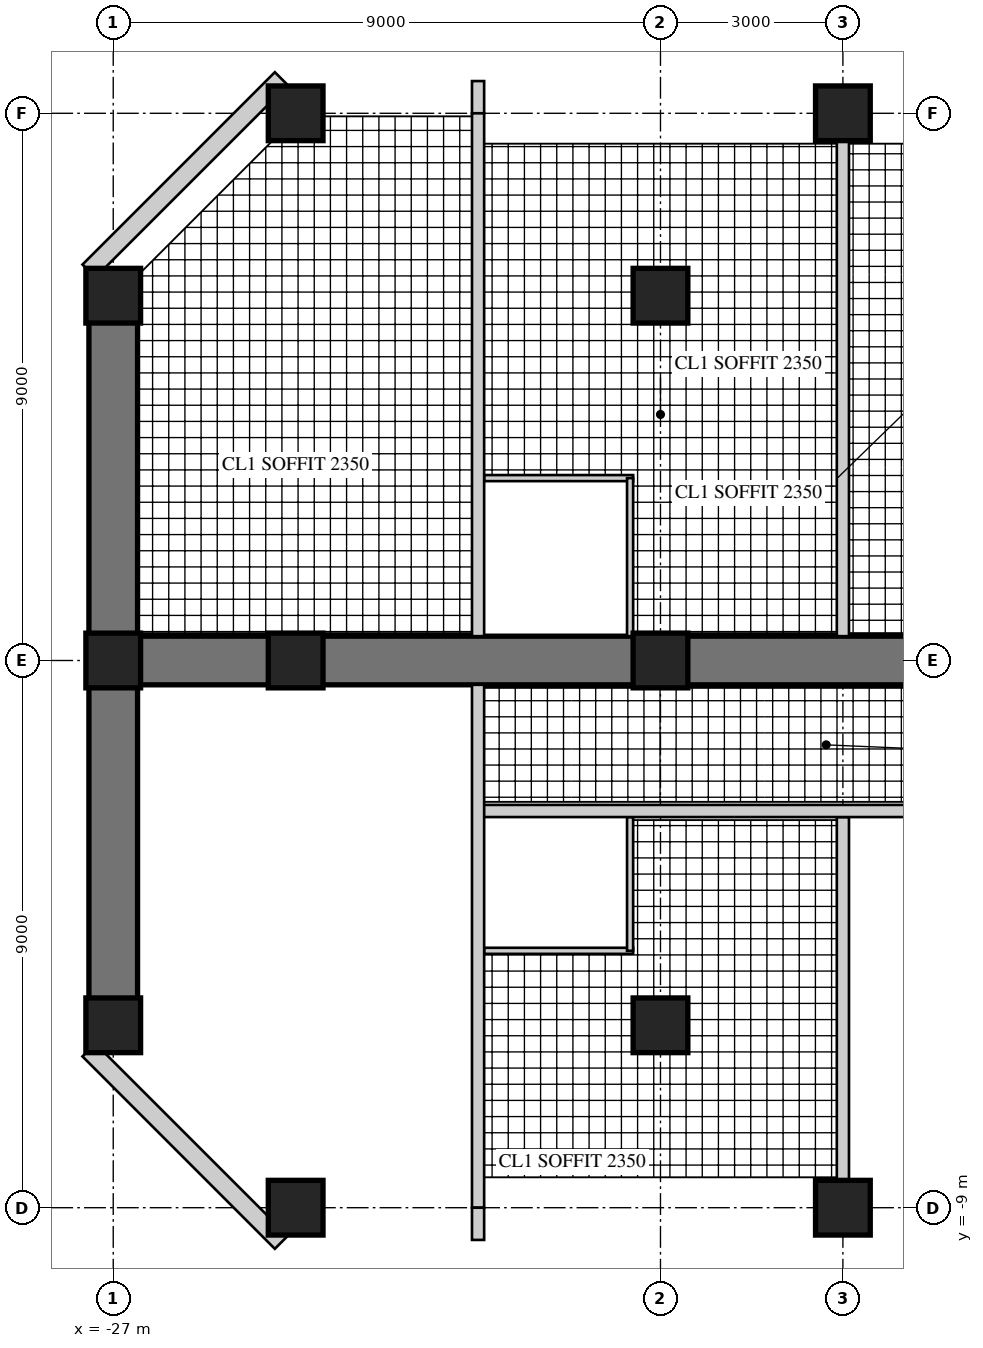
"""IFC4 building model, lengths in metres.
Left out: names, types, materials, properties, quantities, classifications, styles, units other than length and angle.
Written with IfcOpenShell. Run it as: python <this file> out.ifc"""

import sys

from ifc_helpers import new_model, si_unit, direction, frame, frame_2d, origin, origin_2d, place, context, subcontext, project, spatial, rectangle, hollow_rectangle, extrude, element, fill, save


model = new_model("IFC4")
c1 = context("Model", 3, precision=1e-05, world=origin(), true_north=direction((0.0, 1.0)))
c2 = subcontext(c1, "Body", "Model", "MODEL_VIEW")
j1 = project(units=[si_unit("LENGTHUNIT", "METRE"), si_unit("PLANEANGLEUNIT", "RADIAN")], contexts=[c1])
p1 = place(None, origin())
s1 = spatial("IfcSite", under=j1, at=p1, CompositionType="ELEMENT")
p2 = place(p1, origin())
s2 = spatial("IfcBuilding", under=s1, at=p2, CompositionType="ELEMENT")
p3 = place(p2, frame((0.0, 0.0, 179.7)))
s3 = spatial("IfcBuildingStorey", under=s2, at=p3, CompositionType="ELEMENT", Elevation=179.7)
p4 = place(p3, frame((-9.0, 0.0, 0.0), z_axis=(0.0, 0.0, 1.0), x_axis=(-1.0, 0.0, 0.0)))
e1 = element("IfcWall", 1, at=p4, inside=s3, PredefinedType="SHEAR", context=c2, shape_type="SweptSolid", body=[
    extrude(rectangle(XDim=18.0, YDim=0.8, at=frame_2d((9.0, 0.0))), origin(), (0.0, 0.0, 1.0), 3.4),
])
p5 = place(p4, frame((3.95, 0.0, 0.0)))
e2 = element("IfcOpeningElement", 2, at=p5, cuts=e1, PredefinedType="OPENING", context=c2, shape_type="SweptSolid", body=[
    extrude(rectangle(XDim=1.0, YDim=2.15, at=frame_2d((0.5, 1.075))), frame((0.0, 0.41, 0.0), z_axis=(0.0, -1.0, 0.0), x_axis=(1.0, 0.0, 0.0)), (0.0, 0.0, 1.0), 0.82),
])
p6 = place(p4, frame((6.6, 0.0, 0.0)))
e3 = element("IfcOpeningElement", 3, at=p6, cuts=e1, PredefinedType="OPENING", context=c2, shape_type="SweptSolid", body=[
    extrude(rectangle(XDim=1.0, YDim=2.15, at=frame_2d((0.5, 1.075))), frame((0.0, 0.41, 0.0), z_axis=(0.0, -1.0, 0.0), x_axis=(1.0, 0.0, 0.0)), (0.0, 0.0, 1.0), 0.82),
])
p7 = place(p4, frame((13.25, 0.0, 0.0)))
e4 = element("IfcOpeningElement", 4, at=p7, cuts=e1, PredefinedType="OPENING", context=c2, shape_type="SweptSolid", body=[
    extrude(rectangle(XDim=1.0, YDim=2.2, at=frame_2d((0.5, 1.1))), frame((0.0, 0.41, 0.0), z_axis=(0.0, -1.0, 0.0), x_axis=(1.0, 0.0, 0.0)), (0.0, 0.0, 1.0), 0.82),
])
p8 = place(p3, frame((-27.0, 6.0, 0.0), z_axis=(0.0, 0.0, 1.0), x_axis=(0.0, -1.0, 0.0)))
e5 = element("IfcWall", 5, at=p8, inside=s3, PredefinedType="SHEAR", context=c2, shape_type="SweptSolid", body=[
    extrude(rectangle(XDim=12.0, YDim=0.8, at=frame_2d((6.0, 0.0))), origin(), (0.0, 0.0, 1.0), 3.4),
])
p9 = place(p8, frame((1.625, 0.0, 0.6)))
e6 = element("IfcOpeningElement", 6, at=p9, cuts=e5, PredefinedType="OPENING", context=c2, shape_type="SweptSolid", body=[
    extrude(rectangle(XDim=3.0, YDim=2.4, at=frame_2d((1.5, 1.2))), frame((0.0, 0.41, 0.0), z_axis=(0.0, -1.0, 0.0), x_axis=(1.0, 0.0, 0.0)), (0.0, 0.0, 1.0), 0.82),
])
p10 = place(p8, frame((7.375, 0.0, 0.6)))
e7 = element("IfcOpeningElement", 7, at=p10, cuts=e5, PredefinedType="OPENING", context=c2, shape_type="SweptSolid", body=[
    extrude(rectangle(XDim=3.0, YDim=2.4, at=frame_2d((1.5, 1.2))), frame((0.0, 0.41, 0.0), z_axis=(0.0, -1.0, 0.0), x_axis=(1.0, 0.0, 0.0)), (0.0, 0.0, 1.0), 0.82),
])
for number, where, z_axis, x_axis in (
    (8, (-15.0, 9.0, 0.0), (0.0, 0.0, 1.0), (1.0, 0.0, 0.0)),
    (9, (-24.0, 9.0, 0.0), (0.0, 0.0, 1.0), (1.0, 0.0, 0.0)),
    (10, (-15.0, -9.0, 0.0), (0.0, 0.0, 1.0), (1.0, 0.0, 0.0)),
    (11, (-24.0, -9.0, 0.0), (0.0, 0.0, 1.0), (1.0, 0.0, 0.0)),
    (12, (-27.0, 6.0, 0.0), (0.0, 0.0, 1.0), (1.0, 0.0, 0.0)),
    (13, (-27.0, 0.0, 0.0), (0.0, 0.0, 1.0), (1.0, 0.0, 0.0)),
    (14, (-27.0, -6.0, 0.0), (0.0, 0.0, 1.0), (1.0, 0.0, 0.0)),
    (15, (-18.0, 6.0, 0.0), (0.0, 0.0, 1.0), (1.0, 0.0, 0.0)),
    (16, (-18.0, 0.0, 0.0), (0.0, 0.0, 1.0), (1.0, 0.0, 0.0)),
    (17, (-18.0, -6.0, 0.0), (0.0, 0.0, 1.0), (1.0, 0.0, 0.0)),
    (18, (-24.0, 0.0, 0.0), (0.0, 0.0, 1.0), (1.0, 0.0, 0.0)),
):
    element("IfcColumn", number, at=place(p3, frame(where, z_axis=z_axis, x_axis=x_axis)), inside=s3, PredefinedType="COLUMN", context=c2, shape_type="SweptSolid", body=[
        extrude(rectangle(XDim=0.9, YDim=0.9, at=origin_2d()), origin(), (0.0, 0.0, 1.0), 3.4),
    ])
p11 = place(p3, frame((-24.236, 9.57, 0.0), z_axis=(0.0, 0.0, 1.0), x_axis=(-0.707079499254, -0.707134062067, 0.0)))
e19 = element("IfcWall", 19, at=p11, inside=s3, PredefinedType="SOLIDWALL", context=c2, shape_type="SweptSolid", body=[
    extrude(rectangle(XDim=4.475, YDim=0.3, at=frame_2d((2.237, 0.0))), origin(), (0.0, 0.0, 1.0), 3.22),
])
p12 = place(p11, frame((1.787, 0.0, 0.3)))
e20 = element("IfcOpeningElement", 20, at=p12, cuts=e19, PredefinedType="OPENING", context=c2, shape_type="SweptSolid", body=[
    extrude(rectangle(XDim=0.9, YDim=2.4, at=frame_2d((0.45, 1.2))), frame((0.0, 0.16, 0.0), z_axis=(0.0, -1.0, 0.0), x_axis=(1.0, 0.0, 0.0)), (0.0, 0.0, 1.0), 0.32),
])
p13 = place(p3, frame((-27.4, -6.406, 0.0), z_axis=(0.0, 0.0, 1.0), x_axis=(0.707079499254, -0.707134062067, 0.0)))
e21 = element("IfcWall", 21, at=p13, inside=s3, PredefinedType="SOLIDWALL", context=c2, shape_type="SweptSolid", body=[
    extrude(rectangle(XDim=4.475, YDim=0.3, at=frame_2d((2.237, 0.0))), origin(), (0.0, 0.0, 1.0), 3.22),
])
p14 = place(p13, frame((1.787, 0.0, 0.3)))
e22 = element("IfcOpeningElement", 22, at=p14, cuts=e21, PredefinedType="OPENING", context=c2, shape_type="SweptSolid", body=[
    extrude(rectangle(XDim=0.9, YDim=2.4, at=frame_2d((0.45, 1.2))), frame((0.0, 0.16, 0.0), z_axis=(0.0, -1.0, 0.0), x_axis=(1.0, 0.0, 0.0)), (0.0, 0.0, 1.0), 0.32),
])
p15 = place(p3, frame((-15.0, -2.575, 0.0), z_axis=(0.0, 0.0, 1.0), x_axis=(0.0, -1.0, 0.0)))
e23 = element("IfcWall", 23, at=p15, inside=s3, PredefinedType="SOLIDWALL", context=c2, shape_type="SweptSolid", body=[
    extrude(rectangle(XDim=5.975, YDim=0.2, at=frame_2d((2.988, 0.0))), origin(), (0.0, 0.0, 1.0), 2.47),
])
p16 = place(p3, frame((-15.0, 8.55, 0.0), z_axis=(0.0, 0.0, 1.0), x_axis=(0.0, -1.0, 0.0)))
e24 = element("IfcWall", 24, at=p16, inside=s3, PredefinedType="SOLIDWALL", context=c2, shape_type="SweptSolid", body=[
    extrude(rectangle(XDim=8.15, YDim=0.2, at=frame_2d((4.075, 0.0))), origin(), (0.0, 0.0, 1.0), 2.47),
])
p17 = place(p3, frame((-18.45, -4.775, 0.0), z_axis=(0.0, 0.0, 1.0), x_axis=(-1.0, 0.0, 0.0)))
e25 = element("IfcWall", 25, at=p17, inside=s3, PredefinedType="PARTITIONING", context=c2, shape_type="SweptSolid", body=[
    extrude(rectangle(XDim=2.45, YDim=0.1, at=frame_2d((1.225, 0.0))), origin(), (0.0, 0.0, 1.0), 3.22),
])
p18 = place(p3, frame((-18.5, -2.575, 0.0), z_axis=(0.0, 0.0, 1.0), x_axis=(0.0, -1.0, 0.0)))
e26 = element("IfcWall", 26, at=p18, inside=s3, PredefinedType="PARTITIONING", context=c2, shape_type="SweptSolid", body=[
    extrude(rectangle(XDim=2.2, YDim=0.1, at=frame_2d((1.1, 0.0))), origin(), (0.0, 0.0, 1.0), 3.22),
])
p19 = place(p18, frame((0.55, 0.0, 0.0)))
e27 = element("IfcOpeningElement", 27, at=p19, cuts=e26, PredefinedType="OPENING", context=c2, shape_type="SweptSolid", body=[
    extrude(rectangle(XDim=0.9, YDim=2.1, at=frame_2d((0.45, 1.05))), frame((0.0, 0.06, 0.0), z_axis=(0.0, -1.0, 0.0), x_axis=(1.0, 0.0, 0.0)), (0.0, 0.0, 1.0), 0.12),
])
p20 = place(p3, frame((-18.45, 3.0, 0.0), z_axis=(0.0, 0.0, 1.0), x_axis=(-1.0, 0.0, 0.0)))
e28 = element("IfcWall", 28, at=p20, inside=s3, PredefinedType="PARTITIONING", context=c2, shape_type="SweptSolid", body=[
    extrude(rectangle(XDim=2.45, YDim=0.1, at=frame_2d((1.225, 0.0))), origin(), (0.0, 0.0, 1.0), 3.22),
])
p21 = place(p3, frame((-18.5, 3.0, 0.0), z_axis=(0.0, 0.0, 1.0), x_axis=(0.0, -1.0, 0.0)))
e29 = element("IfcWall", 29, at=p21, inside=s3, PredefinedType="PARTITIONING", context=c2, shape_type="SweptSolid", body=[
    extrude(rectangle(XDim=2.6, YDim=0.1, at=frame_2d((1.3, 0.0))), origin(), (0.0, 0.0, 1.0), 3.22),
])
p22 = place(p21, frame((0.55, 0.0, 0.0)))
e30 = element("IfcOpeningElement", 30, at=p22, cuts=e29, PredefinedType="OPENING", context=c2, shape_type="SweptSolid", body=[
    extrude(rectangle(XDim=0.9, YDim=2.1, at=frame_2d((0.45, 1.05))), frame((0.0, 0.06, 0.0), z_axis=(0.0, -1.0, 0.0), x_axis=(1.0, 0.0, 0.0)), (0.0, 0.0, 1.0), 0.12),
])
p23 = place(p3, frame((-9.55, -2.475, 0.0), z_axis=(0.0, 0.0, 1.0), x_axis=(-1.0, 0.0, 0.0)))
e31 = element("IfcWall", 31, at=p23, inside=s3, PredefinedType="SOLIDWALL", context=c2, shape_type="SweptSolid", body=[
    extrude(rectangle(XDim=11.45, YDim=0.2, at=frame_2d((5.725, 0.0))), origin(), (0.0, 0.0, 1.0), 3.22),
])
p24 = place(p23, frame((3.6, 0.0, 0.0)))
e32 = element("IfcOpeningElement", 32, at=p24, cuts=e31, PredefinedType="OPENING", context=c2, shape_type="SweptSolid", body=[
    extrude(rectangle(XDim=1.0, YDim=2.15, at=frame_2d((0.5, 1.075))), frame((0.0, 0.11, 0.0), z_axis=(0.0, -1.0, 0.0), x_axis=(1.0, 0.0, 0.0)), (0.0, 0.0, 1.0), 0.22),
])
p25 = place(p23, frame((6.05, 0.0, 0.0)))
e33 = element("IfcOpeningElement", 33, at=p25, cuts=e31, PredefinedType="OPENING", context=c2, shape_type="SweptSolid", body=[
    extrude(rectangle(XDim=1.0, YDim=2.15, at=frame_2d((0.5, 1.075))), frame((0.0, 0.11, 0.0), z_axis=(0.0, -1.0, 0.0), x_axis=(1.0, 0.0, 0.0)), (0.0, 0.0, 1.0), 0.22),
])
p26 = place(p3, frame((-21.0, 9.53, 0.0), z_axis=(0.0, 0.0, 1.0), x_axis=(0.0, -1.0, 0.0)))
e34 = element("IfcWall", 34, at=p26, inside=s3, PredefinedType="SOLIDWALL", context=c2, shape_type="SweptSolid", body=[
    extrude(rectangle(XDim=0.53, YDim=0.2, at=frame_2d((0.265, 0.0))), origin(), (0.0, 0.0, 1.0), 3.22),
])
p27 = place(p3, frame((-21.0, 9.0, 0.0), z_axis=(0.0, 0.0, 1.0), x_axis=(0.0, -1.0, 0.0)))
e35 = element("IfcWall", 35, at=p27, inside=s3, PredefinedType="SOLIDWALL", context=c2, shape_type="SweptSolid", body=[
    extrude(rectangle(XDim=8.6, YDim=0.2, at=frame_2d((4.3, 0.0))), origin(), (0.0, 0.0, 1.0), 2.62),
])
p28 = place(p3, frame((-21.0, -0.4, 0.0), z_axis=(0.0, 0.0, 1.0), x_axis=(0.0, -1.0, 0.0)))
e36 = element("IfcWall", 36, at=p28, inside=s3, PredefinedType="SOLIDWALL", context=c2, shape_type="SweptSolid", body=[
    extrude(rectangle(XDim=8.6, YDim=0.2, at=frame_2d((4.3, 0.0))), origin(), (0.0, 0.0, 1.0), 2.62),
])
p29 = place(p28, frame((0.4, 0.0, 0.0)))
e37 = element("IfcOpeningElement", 37, at=p29, cuts=e36, PredefinedType="OPENING", context=c2, shape_type="SweptSolid", body=[
    extrude(rectangle(XDim=1.0, YDim=2.2, at=frame_2d((0.5, 1.1))), frame((0.0, 0.11, 0.0), z_axis=(0.0, -1.0, 0.0), x_axis=(1.0, 0.0, 0.0)), (0.0, 0.0, 1.0), 0.22),
])
p30 = place(p3, frame((-21.0, -9.0, 0.0), z_axis=(0.0, 0.0, 1.0), x_axis=(0.0, -1.0, 0.0)))
e38 = element("IfcWall", 38, at=p30, inside=s3, PredefinedType="SOLIDWALL", context=c2, shape_type="SweptSolid", body=[
    extrude(rectangle(XDim=0.53, YDim=0.2, at=frame_2d((0.265, 0.0))), origin(), (0.0, 0.0, 1.0), 3.22),
])
p31 = place(p12, origin())
e39 = element("IfcWindow", 39, at=p31, inside=s3, PartitioningType="SINGLE_PANEL", PredefinedType="WINDOW", context=c2, shape_type="SweptSolid", body=[
    extrude(hollow_rectangle(XDim=0.9, YDim=2.4, WallThickness=0.06, at=frame_2d((0.45, 1.2))), frame((0.0, 0.03, 0.0), z_axis=(0.0, -1.0, 0.0), x_axis=(1.0, 0.0, 0.0)), (0.0, 0.0, 1.0), 0.06),
    extrude(rectangle(XDim=0.779, YDim=2.279, at=frame_2d((0.45, 1.2))), frame((0.0, 0.03, 0.0), z_axis=(0.0, -1.0, 0.0), x_axis=(1.0, 0.0, 0.0)), (0.0, 0.0, 1.0), 0.06),
])
fill(e20, e39)
p32 = place(p9, origin())
e40 = element("IfcWindow", 40, at=p32, inside=s3, PartitioningType="SINGLE_PANEL", PredefinedType="WINDOW", context=c2, shape_type="SweptSolid", body=[
    extrude(hollow_rectangle(XDim=3.0, YDim=2.4, WallThickness=0.06, at=frame_2d((1.5, 1.2))), frame((0.0, 0.03, 0.0), z_axis=(0.0, -1.0, 0.0), x_axis=(1.0, 0.0, 0.0)), (0.0, 0.0, 1.0), 0.06),
    extrude(rectangle(XDim=2.879, YDim=2.279, at=frame_2d((1.5, 1.2))), frame((0.0, 0.03, 0.0), z_axis=(0.0, -1.0, 0.0), x_axis=(1.0, 0.0, 0.0)), (0.0, 0.0, 1.0), 0.06),
])
fill(e6, e40)
p33 = place(p10, origin())
e41 = element("IfcWindow", 41, at=p33, inside=s3, PartitioningType="SINGLE_PANEL", PredefinedType="WINDOW", context=c2, shape_type="SweptSolid", body=[
    extrude(hollow_rectangle(XDim=3.0, YDim=2.4, WallThickness=0.06, at=frame_2d((1.5, 1.2))), frame((0.0, 0.03, 0.0), z_axis=(0.0, -1.0, 0.0), x_axis=(1.0, 0.0, 0.0)), (0.0, 0.0, 1.0), 0.06),
    extrude(rectangle(XDim=2.879, YDim=2.279, at=frame_2d((1.5, 1.2))), frame((0.0, 0.03, 0.0), z_axis=(0.0, -1.0, 0.0), x_axis=(1.0, 0.0, 0.0)), (0.0, 0.0, 1.0), 0.06),
])
fill(e7, e41)
p34 = place(p14, origin())
e42 = element("IfcWindow", 42, at=p34, inside=s3, PartitioningType="SINGLE_PANEL", PredefinedType="WINDOW", context=c2, shape_type="SweptSolid", body=[
    extrude(hollow_rectangle(XDim=0.9, YDim=2.4, WallThickness=0.06, at=frame_2d((0.45, 1.2))), frame((0.0, 0.03, 0.0), z_axis=(0.0, -1.0, 0.0), x_axis=(1.0, 0.0, 0.0)), (0.0, 0.0, 1.0), 0.06),
    extrude(rectangle(XDim=0.779, YDim=2.279, at=frame_2d((0.45, 1.2))), frame((0.0, 0.03, 0.0), z_axis=(0.0, -1.0, 0.0), x_axis=(1.0, 0.0, 0.0)), (0.0, 0.0, 1.0), 0.06),
])
fill(e22, e42)
p35 = place(p19, frame((0.9, 0.0, 0.0), z_axis=(0.0, 0.0, 1.0), x_axis=(-1.0, 0.0, 0.0)))
e43 = element("IfcDoor", 43, at=p35, inside=s3, OperationType="SINGLE_SWING_RIGHT", PredefinedType="DOOR", context=c2, shape_type="SweptSolid", body=[
    extrude(rectangle(XDim=0.9, YDim=2.1, at=frame_2d((0.45, 1.05))), frame((0.0, 0.025, 0.0), z_axis=(0.0, -1.0, 0.0), x_axis=(1.0, 0.0, 0.0)), (0.0, 0.0, 1.0), 0.05),
])
fill(e27, e43)
p36 = place(p22, frame((0.9, 0.0, 0.0), z_axis=(0.0, 0.0, 1.0), x_axis=(-1.0, 0.0, 0.0)))
e44 = element("IfcDoor", 44, at=p36, inside=s3, OperationType="SINGLE_SWING_RIGHT", PredefinedType="DOOR", context=c2, shape_type="SweptSolid", body=[
    extrude(rectangle(XDim=0.9, YDim=2.1, at=frame_2d((0.45, 1.05))), frame((0.0, 0.025, 0.0), z_axis=(0.0, -1.0, 0.0), x_axis=(1.0, 0.0, 0.0)), (0.0, 0.0, 1.0), 0.05),
])
fill(e30, e44)
p37 = place(p24, origin())
e45 = element("IfcDoor", 45, at=p37, inside=s3, OperationType="SINGLE_SWING_LEFT", PredefinedType="DOOR", context=c2, shape_type="SweptSolid", body=[
    extrude(rectangle(XDim=1.0, YDim=2.15, at=frame_2d((0.5, 1.075))), frame((0.0, 0.025, 0.0), z_axis=(0.0, -1.0, 0.0), x_axis=(1.0, 0.0, 0.0)), (0.0, 0.0, 1.0), 0.05),
])
fill(e32, e45)
p38 = place(p25, origin())
e46 = element("IfcDoor", 46, at=p38, inside=s3, OperationType="SINGLE_SWING_LEFT", PredefinedType="DOOR", context=c2, shape_type="SweptSolid", body=[
    extrude(rectangle(XDim=1.0, YDim=2.15, at=frame_2d((0.5, 1.075))), frame((0.0, 0.025, 0.0), z_axis=(0.0, -1.0, 0.0), x_axis=(1.0, 0.0, 0.0)), (0.0, 0.0, 1.0), 0.05),
])
fill(e33, e46)
p39 = place(p29, frame((1.0, 0.0, 0.0), z_axis=(0.0, 0.0, 1.0), x_axis=(-1.0, 0.0, 0.0)))
e47 = element("IfcDoor", 47, at=p39, inside=s3, OperationType="SINGLE_SWING_RIGHT", PredefinedType="DOOR", context=c2, shape_type="SweptSolid", body=[
    extrude(rectangle(XDim=1.0, YDim=2.2, at=frame_2d((0.5, 1.1))), frame((0.0, 0.025, 0.0), z_axis=(0.0, -1.0, 0.0), x_axis=(1.0, 0.0, 0.0)), (0.0, 0.0, 1.0), 0.05),
])
fill(e37, e47)
p40 = place(p6, frame((1.0, 0.0, 0.0), z_axis=(0.0, 0.0, 1.0), x_axis=(-1.0, 0.0, 0.0)))
e48 = element("IfcDoor", 48, at=p40, inside=s3, OperationType="SINGLE_SWING_RIGHT", PredefinedType="DOOR", context=c2, shape_type="SweptSolid", body=[
    extrude(rectangle(XDim=1.0, YDim=2.15, at=frame_2d((0.5, 1.075))), frame((0.0, 0.025, 0.0), z_axis=(0.0, -1.0, 0.0), x_axis=(1.0, 0.0, 0.0)), (0.0, 0.0, 1.0), 0.05),
])
fill(e3, e48)
p41 = place(p7, origin())
e49 = element("IfcDoor", 49, at=p41, inside=s3, OperationType="SINGLE_SWING_LEFT", PredefinedType="DOOR", context=c2, shape_type="SweptSolid", body=[
    extrude(rectangle(XDim=1.0, YDim=2.2, at=frame_2d((0.5, 1.1))), frame((0.0, 0.025, 0.0), z_axis=(0.0, -1.0, 0.0), x_axis=(1.0, 0.0, 0.0)), (0.0, 0.0, 1.0), 0.05),
])
fill(e4, e49)
save(model, sys.argv[1])
